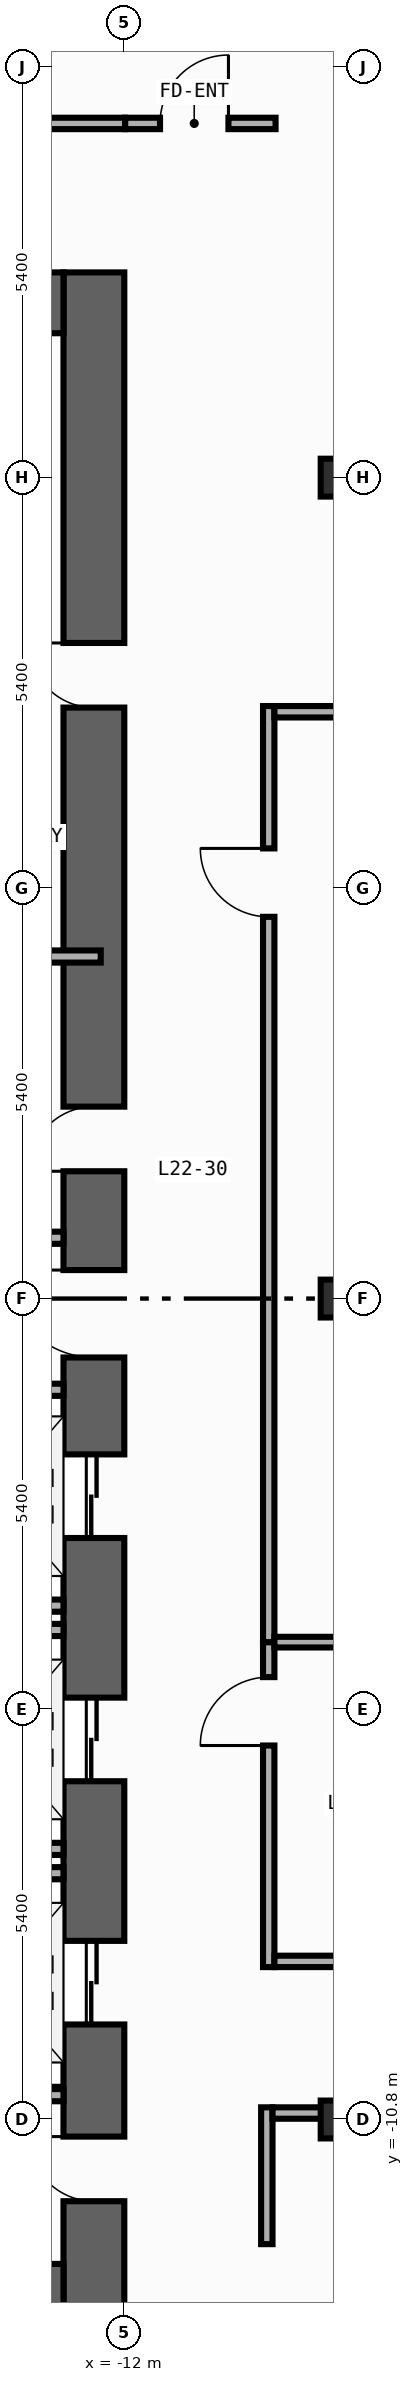
"""IFC4 building model, lengths in metres.
Left out: names, types, materials, properties, quantities, classifications, styles, units other than length and angle.
Written with IfcOpenShell. Run it as: python <this file> out.ifc"""

import sys

from ifc_helpers import new_model, si_unit, direction, frame, frame_2d, origin, origin_2d, place, context, subcontext, project, spatial, rectangle, i_section, extrude, element, fill, save


model = new_model("IFC4")
c1 = context("Model", 3, precision=1e-05, world=origin(), true_north=direction((0.0, 1.0)))
c2 = subcontext(c1, "Body", "Model", "MODEL_VIEW")
j1 = project(units=[si_unit("LENGTHUNIT", "METRE"), si_unit("PLANEANGLEUNIT", "RADIAN")], contexts=[c1])
p1 = place(None, origin())
s1 = spatial("IfcSite", under=j1, at=p1, CompositionType="ELEMENT")
p2 = place(p1, origin())
s2 = spatial("IfcBuilding", under=s1, at=p2, CompositionType="ELEMENT")
p3 = place(p2, frame((0.0, 0.0, 97.4)))
s3 = spatial("IfcBuildingStorey", under=s2, at=p3, CompositionType="ELEMENT", Elevation=97.4)
p4 = place(p3, frame((-12.4, -13.5, 0.0), z_axis=(0.0, 0.0, 1.0), x_axis=(0.0, 1.0, 0.0)))
e1 = element("IfcWall", 1, at=p4, inside=s3, PredefinedType="SHEAR", context=c2, shape_type="SweptSolid", body=[
    extrude(rectangle(XDim=27.0, YDim=0.8, at=frame_2d((13.5, 0.0))), origin(), (0.0, 0.0, 1.0), 3.94),
])
p5 = place(p4, frame((10.35, 0.0, 0.0)))
e2 = element("IfcOpeningElement", 2, at=p5, cuts=e1, PredefinedType="OPENING", context=c2, shape_type="SweptSolid", body=[
    extrude(rectangle(XDim=1.1, YDim=2.2, at=frame_2d((0.55, 1.1))), frame((0.0, 0.41, 0.0), z_axis=(0.0, -1.0, 0.0), x_axis=(1.0, 0.0, 0.0)), (0.0, 0.0, 1.0), 0.82),
])
p6 = place(p4, frame((7.15, 0.0, 0.0)))
e3 = element("IfcOpeningElement", 3, at=p6, cuts=e1, PredefinedType="OPENING", context=c2, shape_type="SweptSolid", body=[
    extrude(rectangle(XDim=1.1, YDim=2.2, at=frame_2d((0.55, 1.1))), frame((0.0, 0.41, 0.0), z_axis=(0.0, -1.0, 0.0), x_axis=(1.0, 0.0, 0.0)), (0.0, 0.0, 1.0), 0.82),
])
p7 = place(p4, frame((3.95, 0.0, 0.0)))
e4 = element("IfcOpeningElement", 4, at=p7, cuts=e1, PredefinedType="OPENING", context=c2, shape_type="SweptSolid", body=[
    extrude(rectangle(XDim=1.1, YDim=2.2, at=frame_2d((0.55, 1.1))), frame((0.0, 0.41, 0.0), z_axis=(0.0, -1.0, 0.0), x_axis=(1.0, 0.0, 0.0)), (0.0, 0.0, 1.0), 0.82),
])
p8 = place(p4, frame((15.175, 0.0, 0.0)))
e5 = element("IfcOpeningElement", 5, at=p8, cuts=e1, PredefinedType="OPENING", context=c2, shape_type="SweptSolid", body=[
    extrude(rectangle(XDim=0.85, YDim=2.1, at=frame_2d((0.425, 1.05))), frame((0.0, 0.41, 0.0), z_axis=(0.0, -1.0, 0.0), x_axis=(1.0, 0.0, 0.0)), (0.0, 0.0, 1.0), 0.82),
])
p9 = place(p4, frame((21.275, 0.0, 0.0)))
e6 = element("IfcOpeningElement", 6, at=p9, cuts=e1, PredefinedType="OPENING", context=c2, shape_type="SweptSolid", body=[
    extrude(rectangle(XDim=0.85, YDim=2.1, at=frame_2d((0.425, 1.05))), frame((0.0, 0.41, 0.0), z_axis=(0.0, -1.0, 0.0), x_axis=(1.0, 0.0, 0.0)), (0.0, 0.0, 1.0), 0.82),
])
p10 = place(p4, frame((12.725, 0.0, 0.0)))
e7 = element("IfcOpeningElement", 7, at=p10, cuts=e1, PredefinedType="OPENING", context=c2, shape_type="SweptSolid", body=[
    extrude(rectangle(XDim=1.15, YDim=2.2, at=frame_2d((0.575, 1.1))), frame((0.0, 0.41, 0.0), z_axis=(0.0, -1.0, 0.0), x_axis=(1.0, 0.0, 0.0)), (0.0, 0.0, 1.0), 0.82),
])
p11 = place(p4, frame((1.625, 0.0, 0.0)))
e8 = element("IfcOpeningElement", 8, at=p11, cuts=e1, PredefinedType="OPENING", context=c2, shape_type="SweptSolid", body=[
    extrude(rectangle(XDim=0.85, YDim=2.1, at=frame_2d((0.425, 1.05))), frame((0.0, 0.41, 0.0), z_axis=(0.0, -1.0, 0.0), x_axis=(1.0, 0.0, 0.0)), (0.0, 0.0, 1.0), 0.82),
])
for number, where, z_axis, x_axis in (
    (9, (-19.6, -13.1, 0.0), (0.0, 0.0, 1.0), (1.0, 0.0, 0.0)),
    (10, (-19.6, 13.1, 0.0), (0.0, 0.0, 1.0), (1.0, 0.0, 0.0)),
):
    element("IfcWall", number, at=place(p3, frame(where, z_axis=z_axis, x_axis=x_axis)), inside=s3, PredefinedType="SHEAR", context=c2, shape_type="SweptSolid", body=[
        extrude(rectangle(XDim=6.8, YDim=0.8, at=frame_2d((3.4, 0.0))), origin(), (0.0, 0.0, 1.0), 3.94),
    ])
for number, where, z_axis, x_axis in (
    (11, (-9.2, -10.8, 0.0), (0.0, 0.0, 1.0), (1.0, 0.0, 0.0)),
    (12, (-9.2, 0.0, 0.0), (0.0, 0.0, 1.0), (1.0, 0.0, 0.0)),
    (13, (-9.2, 10.8, 0.0), (0.0, 0.0, 1.0), (1.0, 0.0, 0.0)),
):
    element("IfcColumn", number, at=place(p3, frame(where, z_axis=z_axis, x_axis=x_axis)), inside=s3, PredefinedType="COLUMN", context=c2, shape_type="SweptSolid", body=[
        extrude(i_section(OverallWidth=0.432, OverallDepth=0.498, WebThickness=0.045, FlangeThickness=0.07, FilletRadius=0.022, at=origin_2d()), origin(), (0.0, 0.0, 1.0), 4.2),
    ])
for number, where, z_axis, x_axis in (
    (14, (-14.99, -4.04, 0.0), (0.0, 0.0, 1.0), (1.0, 0.0, 0.0)),
    (15, (-14.99, -7.24, 0.0), (0.0, 0.0, 1.0), (1.0, 0.0, 0.0)),
    (16, (-14.99, -4.36, 0.0), (0.0, 0.0, 1.0), (1.0, 0.0, 0.0)),
    (17, (-14.99, -7.56, 0.0), (0.0, 0.0, 1.0), (1.0, 0.0, 0.0)),
):
    element("IfcWall", number, at=place(p3, frame(where, z_axis=z_axis, x_axis=x_axis)), inside=s3, PredefinedType="STANDARD", context=c2, shape_type="SweptSolid", body=[
        extrude(rectangle(XDim=2.19, YDim=0.16, at=frame_2d((1.095, 0.0))), origin(), (0.0, 0.0, 1.0), 3.94),
    ])
for number, where, z_axis, x_axis in (
    (18, (-15.4, 0.8, 0.0), (0.0, 0.0, 1.0), (1.0, 0.0, 0.0)),
    (19, (-15.4, -1.2, 0.0), (0.0, 0.0, 1.0), (1.0, 0.0, 0.0)),
    (20, (-15.4, -10.48, 0.0), (0.0, 0.0, 1.0), (1.0, 0.0, 0.0)),
):
    element("IfcWall", number, at=place(p3, frame(where, z_axis=z_axis, x_axis=x_axis)), inside=s3, PredefinedType="STANDARD", context=c2, shape_type="SweptSolid", body=[
        extrude(rectangle(XDim=2.6, YDim=0.16, at=frame_2d((1.3, 0.0))), origin(), (0.0, 0.0, 1.0), 3.94),
    ])
p12 = place(p3, frame((-15.375, 4.5, 0.0), z_axis=(0.0, 0.0, 1.0), x_axis=(1.0, 0.0, 0.0)))
e21 = element("IfcWall", 21, at=p12, inside=s3, PredefinedType="PARTITIONING", context=c2, shape_type="SweptSolid", body=[
    extrude(rectangle(XDim=3.065, YDim=0.16, at=frame_2d((1.532, 0.0))), origin(), (0.0, 0.0, 1.0), 3.94),
])
p13 = place(p3, frame((-11.99, 15.46, 0.0), z_axis=(0.0, 0.0, 1.0), x_axis=(1.0, 0.0, 0.0)))
e22 = element("IfcWall", 22, at=p13, inside=s3, PredefinedType="PARTITIONING", context=c2, shape_type="SweptSolid", body=[
    extrude(rectangle(XDim=1.98, YDim=0.15, at=frame_2d((0.99, 0.0))), origin(), (0.0, 0.0, 1.0), 3.94),
])
p14 = place(p13, frame((0.46, 0.0, 0.0)))
e23 = element("IfcOpeningElement", 23, at=p14, cuts=e22, PredefinedType="OPENING", context=c2, shape_type="SweptSolid", body=[
    extrude(rectangle(XDim=0.9, YDim=2.15, at=frame_2d((0.45, 1.075))), frame((0.0, 0.085, 0.0), z_axis=(0.0, -1.0, 0.0), x_axis=(1.0, 0.0, 0.0)), (0.0, 0.0, 1.0), 0.17),
])
p15 = place(p3, frame((-10.1, -8.795, 0.0), z_axis=(0.0, 0.0, 1.0), x_axis=(0.0, 1.0, 0.0)))
e24 = element("IfcWall", 24, at=p15, inside=s3, PredefinedType="PARTITIONING", context=c2, shape_type="SweptSolid", body=[
    extrude(rectangle(XDim=4.275, YDim=0.15, at=frame_2d((2.137, 0.0))), origin(), (0.0, 0.0, 1.0), 3.94),
])
p16 = place(p15, frame((2.915, 0.0, 0.0)))
e25 = element("IfcOpeningElement", 25, at=p16, cuts=e24, PredefinedType="OPENING", context=c2, shape_type="SweptSolid", body=[
    extrude(rectangle(XDim=0.9, YDim=2.15, at=frame_2d((0.45, 1.075))), frame((0.0, 0.085, 0.0), z_axis=(0.0, -1.0, 0.0), x_axis=(1.0, 0.0, 0.0)), (0.0, 0.0, 1.0), 0.17),
])
p17 = place(p3, frame((-10.1, -4.52, 0.0), z_axis=(0.0, 0.0, 1.0), x_axis=(0.0, 1.0, 0.0)))
e26 = element("IfcWall", 26, at=p17, inside=s3, PredefinedType="PARTITIONING", context=c2, shape_type="SweptSolid", body=[
    extrude(rectangle(XDim=12.315, YDim=0.15, at=frame_2d((6.157, 0.0))), origin(), (0.0, 0.0, 1.0), 3.94),
])
p18 = place(p17, frame((9.542, 0.0, 0.0)))
e27 = element("IfcOpeningElement", 27, at=p18, cuts=e26, PredefinedType="OPENING", context=c2, shape_type="SweptSolid", body=[
    extrude(rectangle(XDim=0.9, YDim=2.15, at=frame_2d((0.45, 1.075))), frame((0.0, 0.085, 0.0), z_axis=(0.0, -1.0, 0.0), x_axis=(1.0, 0.0, 0.0)), (0.0, 0.0, 1.0), 0.17),
])
p19 = place(p3, frame((-10.125, -12.44, 0.0), z_axis=(0.0, 0.0, 1.0), x_axis=(0.0, 1.0, 0.0)))
e28 = element("IfcWall", 28, at=p19, inside=s3, PredefinedType="PARTITIONING", context=c2, shape_type="SweptSolid", body=[
    extrude(rectangle(XDim=1.8, YDim=0.15, at=frame_2d((0.9, 0.0))), origin(), (0.0, 0.0, 1.0), 3.94),
])
p20 = place(p3, frame((-10.025, 7.72, 0.0), z_axis=(0.0, 0.0, 1.0), x_axis=(1.0, 0.0, 0.0)))
e29 = element("IfcWall", 29, at=p20, inside=s3, PredefinedType="PARTITIONING", context=c2, shape_type="SweptSolid", body=[
    extrude(rectangle(XDim=5.42, YDim=0.15, at=frame_2d((2.71, 0.0))), origin(), (0.0, 0.0, 1.0), 3.94),
])
p21 = place(p20, frame((4.06, 0.0, 0.0)))
e30 = element("IfcOpeningElement", 30, at=p21, cuts=e29, PredefinedType="OPENING", context=c2, shape_type="SweptSolid", body=[
    extrude(rectangle(XDim=0.9, YDim=2.15, at=frame_2d((0.45, 1.075))), frame((0.0, 0.085, 0.0), z_axis=(0.0, -1.0, 0.0), x_axis=(1.0, 0.0, 0.0)), (0.0, 0.0, 1.0), 0.17),
])
p22 = place(p3, frame((-10.025, -8.72, 0.0), z_axis=(0.0, 0.0, 1.0), x_axis=(1.0, 0.0, 0.0)))
e31 = element("IfcWall", 31, at=p22, inside=s3, PredefinedType="PARTITIONING", context=c2, shape_type="SweptSolid", body=[
    extrude(rectangle(XDim=4.465, YDim=0.15, at=frame_2d((2.232, 0.0))), origin(), (0.0, 0.0, 1.0), 3.94),
])
p23 = place(p22, frame((3.105, 0.0, 0.0)))
e32 = element("IfcOpeningElement", 32, at=p23, cuts=e31, PredefinedType="OPENING", context=c2, shape_type="SweptSolid", body=[
    extrude(rectangle(XDim=0.9, YDim=2.15, at=frame_2d((0.45, 1.075))), frame((0.0, 0.085, 0.0), z_axis=(0.0, -1.0, 0.0), x_axis=(1.0, 0.0, 0.0)), (0.0, 0.0, 1.0), 0.17),
])
p24 = place(p3, frame((-10.05, -10.715, 0.0), z_axis=(0.0, 0.0, 1.0), x_axis=(1.0, 0.0, 0.0)))
e33 = element("IfcWall", 33, at=p24, inside=s3, PredefinedType="PARTITIONING", context=c2, shape_type="SweptSolid", body=[
    extrude(rectangle(XDim=8.265, YDim=0.15, at=frame_2d((4.133, 0.0))), origin(), (0.0, 0.0, 1.0), 3.24),
])
p25 = place(p24, frame((6.905, 0.0, 0.0)))
e34 = element("IfcOpeningElement", 34, at=p25, cuts=e33, PredefinedType="OPENING", context=c2, shape_type="SweptSolid", body=[
    extrude(rectangle(XDim=0.9, YDim=2.15, at=frame_2d((0.45, 1.075))), frame((0.0, 0.085, 0.0), z_axis=(0.0, -1.0, 0.0), x_axis=(1.0, 0.0, 0.0)), (0.0, 0.0, 1.0), 0.17),
])
p26 = place(p3, frame((-20.64, 15.46, 0.0), z_axis=(0.0, 0.0, 1.0), x_axis=(1.0, 0.0, 0.0)))
e35 = element("IfcWall", 35, at=p26, inside=s3, PredefinedType="PARTITIONING", context=c2, shape_type="SweptSolid", body=[
    extrude(rectangle(XDim=8.65, YDim=0.15, at=frame_2d((4.325, 0.0))), origin(), (0.0, 0.0, 1.0), 3.94),
])
p27 = place(p26, frame((2.871, 0.0, 0.0)))
e36 = element("IfcOpeningElement", 36, at=p27, cuts=e35, PredefinedType="OPENING", context=c2, shape_type="SweptSolid", body=[
    extrude(rectangle(XDim=0.9, YDim=2.15, at=frame_2d((0.45, 1.075))), frame((0.0, 0.085, 0.0), z_axis=(0.0, -1.0, 0.0), x_axis=(1.0, 0.0, 0.0)), (0.0, 0.0, 1.0), 0.17),
])
p28 = place(p3, frame((-10.025, -4.52, 0.0), z_axis=(0.0, 0.0, 1.0), x_axis=(1.0, 0.0, 0.0)))
e37 = element("IfcWall", 37, at=p28, inside=s3, PredefinedType="PARTITIONING", context=c2, shape_type="SweptSolid", body=[
    extrude(rectangle(XDim=4.465, YDim=0.14, at=frame_2d((2.232, 0.0))), origin(), (0.0, 0.0, 1.0), 3.94),
])
p29 = place(p5, origin())
e38 = element("IfcDoor", 38, at=p29, inside=s3, OperationType="DOUBLE_DOOR_SLIDING", PredefinedType="DOOR", context=c2, shape_type="SweptSolid", body=[
    extrude(rectangle(XDim=1.1, YDim=2.2, at=frame_2d((0.55, 1.1))), frame((0.0, 0.025, 0.0), z_axis=(0.0, -1.0, 0.0), x_axis=(1.0, 0.0, 0.0)), (0.0, 0.0, 1.0), 0.05),
])
fill(e2, e38)
p30 = place(p6, origin())
e39 = element("IfcDoor", 39, at=p30, inside=s3, OperationType="DOUBLE_DOOR_SLIDING", PredefinedType="DOOR", context=c2, shape_type="SweptSolid", body=[
    extrude(rectangle(XDim=1.1, YDim=2.2, at=frame_2d((0.55, 1.1))), frame((0.0, 0.025, 0.0), z_axis=(0.0, -1.0, 0.0), x_axis=(1.0, 0.0, 0.0)), (0.0, 0.0, 1.0), 0.05),
])
fill(e3, e39)
p31 = place(p7, origin())
e40 = element("IfcDoor", 40, at=p31, inside=s3, OperationType="DOUBLE_DOOR_SLIDING", PredefinedType="DOOR", context=c2, shape_type="SweptSolid", body=[
    extrude(rectangle(XDim=1.1, YDim=2.2, at=frame_2d((0.55, 1.1))), frame((0.0, 0.025, 0.0), z_axis=(0.0, -1.0, 0.0), x_axis=(1.0, 0.0, 0.0)), (0.0, 0.0, 1.0), 0.05),
])
fill(e4, e40)
p32 = place(p8, origin())
e41 = element("IfcDoor", 41, at=p32, inside=s3, OperationType="SINGLE_SWING_LEFT", PredefinedType="DOOR", context=c2, shape_type="SweptSolid", body=[
    extrude(rectangle(XDim=0.85, YDim=2.1, at=frame_2d((0.425, 1.05))), frame((0.0, 0.025, 0.0), z_axis=(0.0, -1.0, 0.0), x_axis=(1.0, 0.0, 0.0)), (0.0, 0.0, 1.0), 0.05),
])
fill(e5, e41)
p33 = place(p9, origin())
e42 = element("IfcDoor", 42, at=p33, inside=s3, OperationType="SINGLE_SWING_RIGHT", PredefinedType="DOOR", context=c2, shape_type="SweptSolid", body=[
    extrude(rectangle(XDim=0.85, YDim=2.1, at=frame_2d((0.425, 1.05))), frame((0.0, 0.025, 0.0), z_axis=(0.0, -1.0, 0.0), x_axis=(1.0, 0.0, 0.0)), (0.0, 0.0, 1.0), 0.05),
])
fill(e6, e42)
p34 = place(p10, origin())
e43 = element("IfcDoor", 43, at=p34, inside=s3, OperationType="SINGLE_SWING_RIGHT", PredefinedType="DOOR", context=c2, shape_type="SweptSolid", body=[
    extrude(rectangle(XDim=1.15, YDim=2.2, at=frame_2d((0.575, 1.1))), frame((0.0, 0.025, 0.0), z_axis=(0.0, -1.0, 0.0), x_axis=(1.0, 0.0, 0.0)), (0.0, 0.0, 1.0), 0.05),
])
fill(e7, e43)
p35 = place(p11, origin())
e44 = element("IfcDoor", 44, at=p35, inside=s3, OperationType="SINGLE_SWING_RIGHT", PredefinedType="DOOR", context=c2, shape_type="SweptSolid", body=[
    extrude(rectangle(XDim=0.85, YDim=2.1, at=frame_2d((0.425, 1.05))), frame((0.0, 0.025, 0.0), z_axis=(0.0, -1.0, 0.0), x_axis=(1.0, 0.0, 0.0)), (0.0, 0.0, 1.0), 0.05),
])
fill(e8, e44)
p36 = place(p14, origin())
e45 = element("IfcDoor", 45, at=p36, inside=s3, OperationType="SINGLE_SWING_RIGHT", PredefinedType="DOOR", context=c2, shape_type="SweptSolid", body=[
    extrude(rectangle(XDim=0.9, YDim=2.15, at=frame_2d((0.45, 1.075))), frame((0.0, 0.025, 0.0), z_axis=(0.0, -1.0, 0.0), x_axis=(1.0, 0.0, 0.0)), (0.0, 0.0, 1.0), 0.05),
])
fill(e23, e45)
p37 = place(p16, origin())
e46 = element("IfcDoor", 46, at=p37, inside=s3, OperationType="SINGLE_SWING_LEFT", PredefinedType="DOOR", context=c2, shape_type="SweptSolid", body=[
    extrude(rectangle(XDim=0.9, YDim=2.15, at=frame_2d((0.45, 1.075))), frame((0.0, 0.025, 0.0), z_axis=(0.0, -1.0, 0.0), x_axis=(1.0, 0.0, 0.0)), (0.0, 0.0, 1.0), 0.05),
])
fill(e25, e46)
p38 = place(p18, origin())
e47 = element("IfcDoor", 47, at=p38, inside=s3, OperationType="SINGLE_SWING_RIGHT", PredefinedType="DOOR", context=c2, shape_type="SweptSolid", body=[
    extrude(rectangle(XDim=0.9, YDim=2.15, at=frame_2d((0.45, 1.075))), frame((0.0, 0.025, 0.0), z_axis=(0.0, -1.0, 0.0), x_axis=(1.0, 0.0, 0.0)), (0.0, 0.0, 1.0), 0.05),
])
fill(e27, e47)
save(model, sys.argv[1])
